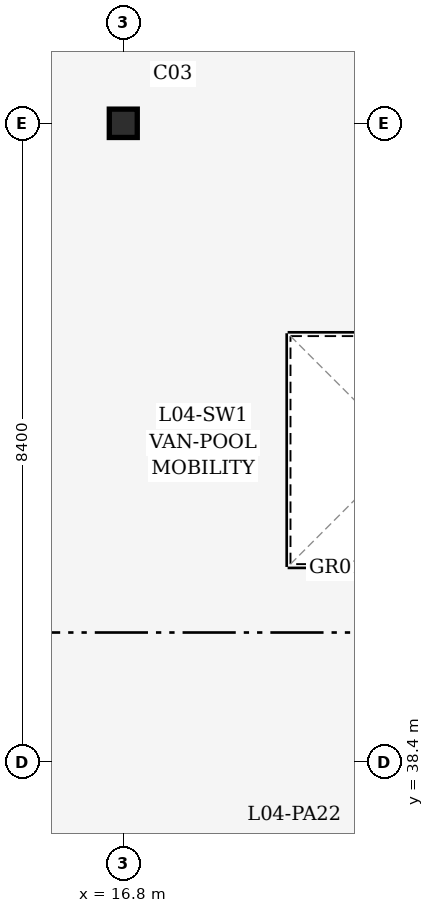
"""IFC4 building model, lengths in metres.
Left out: names, types, materials, properties, quantities, classifications, styles, units other than length and angle.
Written with IfcOpenShell. Run it as: python <this file> out.ifc"""

import sys

from ifc_helpers import new_model, si_unit, direction, frame, origin, origin_2d, place, context, subcontext, project, spatial, i_section, extrude, element, save


model = new_model("IFC4")
c1 = context("Model", 3, precision=1e-05, world=origin(), true_north=direction((0.0, 1.0)))
c2 = subcontext(c1, "Body", "Model", "MODEL_VIEW")
j1 = project(units=[si_unit("LENGTHUNIT", "METRE"), si_unit("PLANEANGLEUNIT", "RADIAN")], contexts=[c1])
p1 = place(None, origin())
s1 = spatial("IfcSite", under=j1, at=p1, CompositionType="ELEMENT")
p2 = place(p1, origin())
s2 = spatial("IfcBuilding", under=s1, at=p2, CompositionType="ELEMENT")
p3 = place(p2, frame((0.0, 0.0, 16.2)))
s3 = spatial("IfcBuildingStorey", under=s2, at=p3, CompositionType="ELEMENT", Elevation=16.2)
for number, where, z_axis, x_axis in (
    (1, (16.8, 38.4, 0.0), (0.0, 0.0, 1.0), (1.0, 0.0, 0.0)),
    (2, (16.8, 46.8, 0.0), (0.0, 0.0, 1.0), (1.0, 0.0, 0.0)),
):
    element("IfcColumn", number, at=place(p3, frame(where, z_axis=z_axis, x_axis=x_axis)), inside=s3, PredefinedType="COLUMN", context=c2, shape_type="SweptSolid", body=[
        extrude(i_section(OverallWidth=0.373, OverallDepth=0.368, WebThickness=0.014, FlangeThickness=0.024, FilletRadius=0.015, at=origin_2d()), origin(), (0.0, 0.0, 1.0), 3.6),
    ])
save(model, sys.argv[1])
